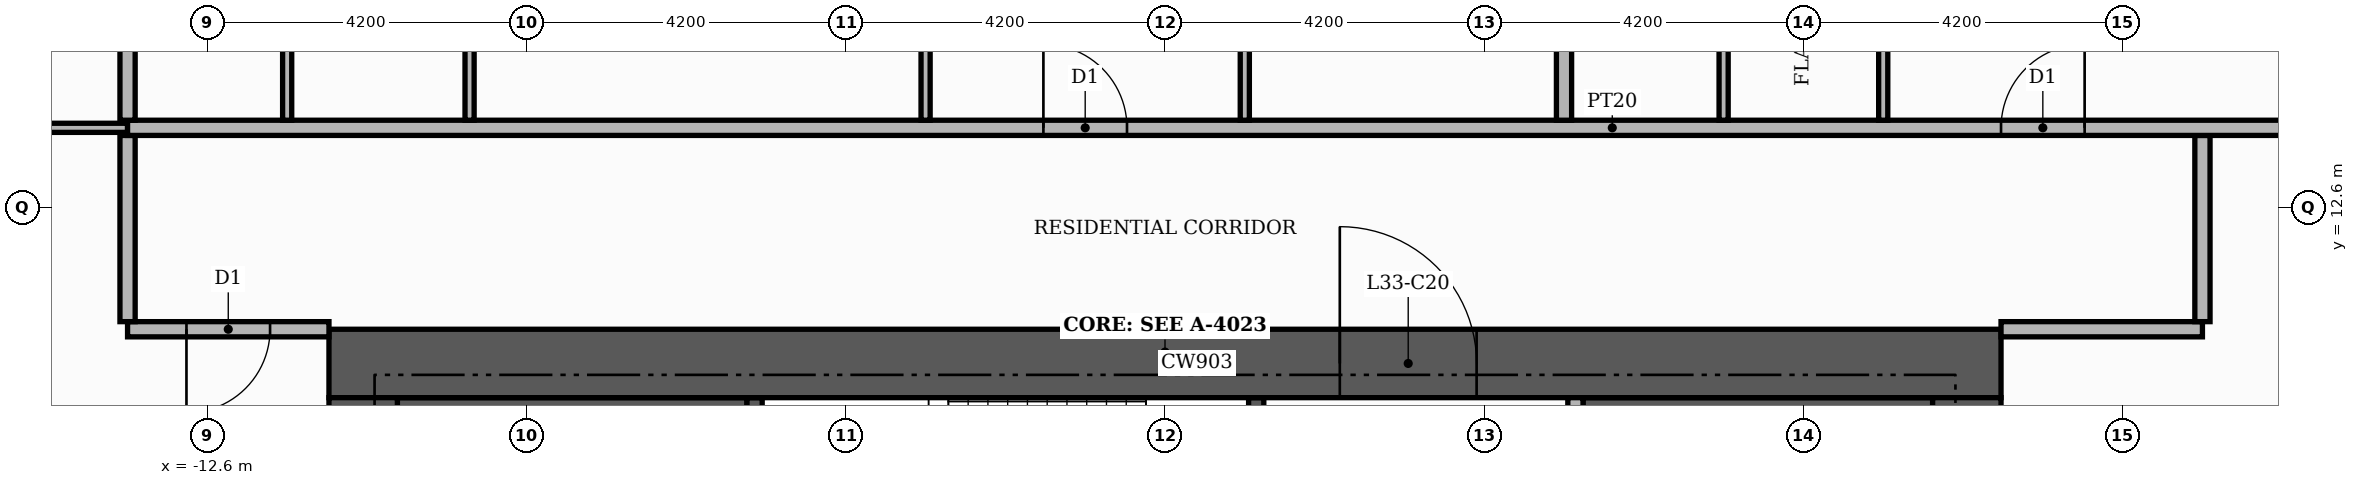
"""IFC4 building model, lengths in metres.
Left out: names, types, materials, properties, quantities, classifications, styles, units other than length and angle.
Written with IfcOpenShell. Run it as: python <this file> out.ifc"""

import sys

from ifc_helpers import new_model, si_unit, direction, frame, frame_2d, origin, place, context, subcontext, project, spatial, rectangle, extrude, element, fill, save


model = new_model("IFC4")
c1 = context("Model", 3, precision=1e-05, world=origin(), true_north=direction((0.0, 1.0)))
c2 = subcontext(c1, "Body", "Model", "MODEL_VIEW")
j1 = project(units=[si_unit("LENGTHUNIT", "METRE"), si_unit("PLANEANGLEUNIT", "RADIAN")], contexts=[c1])
p1 = place(None, origin())
s1 = spatial("IfcSite", under=j1, at=p1, CompositionType="ELEMENT")
p2 = place(p1, origin())
s2 = spatial("IfcBuilding", under=s1, at=p2, CompositionType="ELEMENT")
p3 = place(p2, frame((0.0, 0.0, 141.6)))
s3 = spatial("IfcBuildingStorey", under=s2, at=p3, CompositionType="ELEMENT", Elevation=141.6)
for number, where, z_axis, x_axis in (
    (1, (-10.1, 9.15, 0.0), (0.0, 0.0, 1.0), (1.0, 0.0, 0.0)),
    (2, (5.5, 9.15, 0.0), (0.0, 0.0, 1.0), (1.0, 0.0, 0.0)),
):
    element("IfcWall", number, at=place(p3, frame(where, z_axis=z_axis, x_axis=x_axis)), inside=s3, PredefinedType="SHEAR", context=c2, shape_type="SweptSolid", body=[
        extrude(rectangle(XDim=4.6, YDim=1.9, at=frame_2d((2.3, 0.0))), origin(), (0.0, 0.0, 1.0), 3.48),
    ])
p4 = place(p3, frame((-5.4, 7.25, 0.0), z_axis=(0.0, 0.0, 1.0), x_axis=(0.0, 1.0, 0.0)))
e3 = element("IfcWall", 3, at=p4, inside=s3, PredefinedType="SHEAR", context=c2, shape_type="SweptSolid", body=[
    extrude(rectangle(XDim=2.85, YDim=0.2, at=frame_2d((1.425, 0.0))), origin(), (0.0, 0.0, 1.0), 3.48),
])
p5 = place(p3, frame((1.2, 7.25, 0.0), z_axis=(0.0, 0.0, 1.0), x_axis=(0.0, 1.0, 0.0)))
e4 = element("IfcWall", 4, at=p5, inside=s3, PredefinedType="SHEAR", context=c2, shape_type="SweptSolid", body=[
    extrude(rectangle(XDim=2.85, YDim=0.2, at=frame_2d((1.425, 0.0))), origin(), (0.0, 0.0, 1.0), 3.48),
])
p6 = place(p5, frame((0.85, 0.0, 0.0)))
e5 = element("IfcOpeningElement", 5, at=p6, cuts=e4, PredefinedType="OPENING", context=c2, shape_type="SweptSolid", body=[
    extrude(rectangle(XDim=1.0, YDim=2.1, at=frame_2d((0.5, 1.05))), frame((0.0, 0.11, 0.0), z_axis=(0.0, -1.0, 0.0), x_axis=(1.0, 0.0, 0.0)), (0.0, 0.0, 1.0), 0.22),
])
p7 = place(p3, frame((-11.0, 10.55, 0.0), z_axis=(0.0, 0.0, 1.0), x_axis=(1.0, 0.0, 0.0)))
e6 = element("IfcWall", 6, at=p7, inside=s3, PredefinedType="SHEAR", context=c2, shape_type="SweptSolid", body=[
    extrude(rectangle(XDim=22.0, YDim=0.9, at=frame_2d((11.0, 0.0))), origin(), (0.0, 0.0, 1.0), 3.48),
])
p8 = place(p7, frame((13.3, 0.0, 0.0)))
e7 = element("IfcOpeningElement", 7, at=p8, cuts=e6, PredefinedType="OPENING", context=c2, shape_type="SweptSolid", body=[
    extrude(rectangle(XDim=1.8, YDim=2.2, at=frame_2d((0.9, 1.1))), frame((0.0, 0.46, 0.0), z_axis=(0.0, -1.0, 0.0), x_axis=(1.0, 0.0, 0.0)), (0.0, 0.0, 1.0), 0.92),
])
for number, where, z_axis, x_axis in (
    (8, (-10.55, -10.1, 0.0), (0.0, 0.0, 1.0), (0.0, 1.0, 0.0)),
    (9, (10.55, -10.1, 0.0), (0.0, 0.0, 1.0), (0.0, 1.0, 0.0)),
):
    element("IfcWall", number, at=place(p3, frame(where, z_axis=z_axis, x_axis=x_axis)), inside=s3, PredefinedType="SHEAR", context=c2, shape_type="SweptSolid", body=[
        extrude(rectangle(XDim=20.2, YDim=0.9, at=frame_2d((10.1, 0.0))), origin(), (0.0, 0.0, 1.0), 3.48),
    ])
p9 = place(p3, frame((5.4, 5.5, 0.0), z_axis=(0.0, 0.0, 1.0), x_axis=(0.0, 1.0, 0.0)))
e10 = element("IfcWall", 10, at=p9, inside=s3, PredefinedType="PARTITIONING", context=c2, shape_type="SweptSolid", body=[
    extrude(rectangle(XDim=4.6, YDim=0.2, at=frame_2d((2.3, 0.0))), origin(), (0.0, 0.0, 1.0), 3.48),
])
p10 = place(p9, frame((0.25, 0.0, 0.0)))
e11 = element("IfcOpeningElement", 11, at=p10, cuts=e10, PredefinedType="OPENING", context=c2, shape_type="SweptSolid", body=[
    extrude(rectangle(XDim=1.0, YDim=2.1, at=frame_2d((0.5, 1.05))), frame((0.0, 0.11, 0.0), z_axis=(0.0, -1.0, 0.0), x_axis=(1.0, 0.0, 0.0)), (0.0, 0.0, 1.0), 0.22),
])
p11 = place(p3, frame((-13.65, 11.0, 0.0), z_axis=(0.0, 0.0, 1.0), x_axis=(1.0, 0.0, 0.0)))
e12 = element("IfcWall", 12, at=p11, inside=s3, PredefinedType="PARTITIONING", context=c2, shape_type="SweptSolid", body=[
    extrude(rectangle(XDim=2.65, YDim=0.2, at=frame_2d((1.325, 0.0))), origin(), (0.0, 0.0, 1.0), 3.48),
])
p12 = place(p11, frame((0.775, 0.0, 0.0)))
e13 = element("IfcOpeningElement", 13, at=p12, cuts=e12, PredefinedType="OPENING", context=c2, shape_type="SweptSolid", body=[
    extrude(rectangle(XDim=1.1, YDim=2.4, at=frame_2d((0.55, 1.2))), frame((0.0, 0.11, 0.0), z_axis=(0.0, -1.0, 0.0), x_axis=(1.0, 0.0, 0.0)), (0.0, 0.0, 1.0), 0.22),
])
p13 = place(p3, frame((11.0, 11.0, 0.0), z_axis=(0.0, 0.0, 1.0), x_axis=(1.0, 0.0, 0.0)))
e14 = element("IfcWall", 14, at=p13, inside=s3, PredefinedType="PARTITIONING", context=c2, shape_type="SweptSolid", body=[
    extrude(rectangle(XDim=2.65, YDim=0.2, at=frame_2d((1.325, 0.0))), origin(), (0.0, 0.0, 1.0), 3.48),
])
for number, where, z_axis, x_axis in (
    (15, (-13.65, 11.1, 0.0), (0.0, 0.0, 1.0), (0.0, 1.0, 0.0)),
    (16, (13.65, 11.1, 0.0), (0.0, 0.0, 1.0), (0.0, 1.0, 0.0)),
):
    element("IfcWall", number, at=place(p3, frame(where, z_axis=z_axis, x_axis=x_axis)), inside=s3, PredefinedType="PARTITIONING", context=c2, shape_type="SweptSolid", body=[
        extrude(rectangle(XDim=2.45, YDim=0.2, at=frame_2d((1.225, 0.0))), origin(), (0.0, 0.0, 1.0), 3.48),
    ])
p14 = place(p3, frame((-20.42, 13.65, 0.0), z_axis=(0.0, 0.0, 1.0), x_axis=(1.0, 0.0, 0.0)))
e17 = element("IfcWall", 17, at=p14, inside=s3, PredefinedType="PARTITIONING", context=c2, shape_type="SweptSolid", body=[
    extrude(rectangle(XDim=6.77, YDim=0.12, at=frame_2d((3.385, 0.0))), origin(), (0.0, 0.0, 1.0), 3.48),
])
p15 = place(p14, frame((2.935, 0.0, 0.0)))
e18 = element("IfcOpeningElement", 18, at=p15, cuts=e17, PredefinedType="OPENING", context=c2, shape_type="SweptSolid", body=[
    extrude(rectangle(XDim=0.9, YDim=2.1, at=frame_2d((0.45, 1.05))), frame((0.0, 0.07, 0.0), z_axis=(0.0, -1.0, 0.0), x_axis=(1.0, 0.0, 0.0)), (0.0, 0.0, 1.0), 0.14),
])
p16 = place(p3, frame((-13.65, 13.65, 0.0), z_axis=(0.0, 0.0, 1.0), x_axis=(1.0, 0.0, 0.0)))
e19 = element("IfcWall", 19, at=p16, inside=s3, PredefinedType="PARTITIONING", context=c2, shape_type="SweptSolid", body=[
    extrude(rectangle(XDim=39.07, YDim=0.2, at=frame_2d((19.535, 0.0))), origin(), (0.0, 0.0, 1.0), 3.48),
])
p17 = place(p16, frame((24.65, 0.0, 0.0)))
e20 = element("IfcOpeningElement", 20, at=p17, cuts=e19, PredefinedType="OPENING", context=c2, shape_type="SweptSolid", body=[
    extrude(rectangle(XDim=1.1, YDim=2.4, at=frame_2d((0.55, 1.2))), frame((0.0, 0.11, 0.0), z_axis=(0.0, -1.0, 0.0), x_axis=(1.0, 0.0, 0.0)), (0.0, 0.0, 1.0), 0.22),
])
p18 = place(p16, frame((12.05, 0.0, 0.0)))
e21 = element("IfcOpeningElement", 21, at=p18, cuts=e19, PredefinedType="OPENING", context=c2, shape_type="SweptSolid", body=[
    extrude(rectangle(XDim=1.1, YDim=2.4, at=frame_2d((0.55, 1.2))), frame((0.0, 0.11, 0.0), z_axis=(0.0, -1.0, 0.0), x_axis=(1.0, 0.0, 0.0)), (0.0, 0.0, 1.0), 0.22),
])
p19 = place(p3, frame((-13.65, 13.75, 0.0), z_axis=(0.0, 0.0, 1.0), x_axis=(0.0, 1.0, 0.0)))
e22 = element("IfcWall", 22, at=p19, inside=s3, PredefinedType="PARTITIONING", context=c2, shape_type="SweptSolid", body=[
    extrude(rectangle(XDim=11.67, YDim=0.2, at=frame_2d((5.835, 0.0))), origin(), (0.0, 0.0, 1.0), 3.48),
])
for number, where, z_axis, x_axis in (
    (23, (-11.55, 13.75, 0.0), (0.0, 0.0, 1.0), (0.0, 1.0, 0.0)),
    (24, (-9.15, 13.75, 0.0), (0.0, 0.0, 1.0), (0.0, 1.0, 0.0)),
    (25, (-3.15, 13.75, 0.0), (0.0, 0.0, 1.0), (0.0, 1.0, 0.0)),
):
    element("IfcWall", number, at=place(p3, frame(where, z_axis=z_axis, x_axis=x_axis)), inside=s3, PredefinedType="PARTITIONING", context=c2, shape_type="SweptSolid", body=[
        extrude(rectangle(XDim=5.41, YDim=0.12, at=frame_2d((2.705, 0.0))), origin(), (0.0, 0.0, 1.0), 3.48),
    ])
p20 = place(p3, frame((1.05, 13.75, 0.0), z_axis=(0.0, 0.0, 1.0), x_axis=(0.0, 1.0, 0.0)))
e26 = element("IfcWall", 26, at=p20, inside=s3, PredefinedType="PARTITIONING", context=c2, shape_type="SweptSolid", body=[
    extrude(rectangle(XDim=5.41, YDim=0.12, at=frame_2d((2.705, 0.0))), origin(), (0.0, 0.0, 1.0), 3.48),
])
p21 = place(p20, frame((2.185, 0.0, 0.0)))
e27 = element("IfcOpeningElement", 27, at=p21, cuts=e26, PredefinedType="OPENING", context=c2, shape_type="SweptSolid", body=[
    extrude(rectangle(XDim=1.0, YDim=2.1, at=frame_2d((0.5, 1.05))), frame((0.0, 0.07, 0.0), z_axis=(0.0, -1.0, 0.0), x_axis=(1.0, 0.0, 0.0)), (0.0, 0.0, 1.0), 0.14),
])
p22 = place(p3, frame((5.25, 13.75, 0.0), z_axis=(0.0, 0.0, 1.0), x_axis=(0.0, 1.0, 0.0)))
e28 = element("IfcWall", 28, at=p22, inside=s3, PredefinedType="PARTITIONING", context=c2, shape_type="SweptSolid", body=[
    extrude(rectangle(XDim=6.67, YDim=0.2, at=frame_2d((3.335, 0.0))), origin(), (0.0, 0.0, 1.0), 3.48),
])
p23 = place(p3, frame((7.35, 13.75, 0.0), z_axis=(0.0, 0.0, 1.0), x_axis=(0.0, 1.0, 0.0)))
e29 = element("IfcWall", 29, at=p23, inside=s3, PredefinedType="PARTITIONING", context=c2, shape_type="SweptSolid", body=[
    extrude(rectangle(XDim=5.11, YDim=0.12, at=frame_2d((2.555, 0.0))), origin(), (0.0, 0.0, 1.0), 3.48),
])
p24 = place(p3, frame((9.45, 13.75, 0.0), z_axis=(0.0, 0.0, 1.0), x_axis=(0.0, 1.0, 0.0)))
e30 = element("IfcWall", 30, at=p24, inside=s3, PredefinedType="PARTITIONING", context=c2, shape_type="SweptSolid", body=[
    extrude(rectangle(XDim=5.11, YDim=0.12, at=frame_2d((2.555, 0.0))), origin(), (0.0, 0.0, 1.0), 3.48),
])
p25 = place(p24, frame((2.085, 0.0, 0.0)))
e31 = element("IfcOpeningElement", 31, at=p25, cuts=e30, PredefinedType="OPENING", context=c2, shape_type="SweptSolid", body=[
    extrude(rectangle(XDim=0.9, YDim=2.1, at=frame_2d((0.45, 1.05))), frame((0.0, 0.07, 0.0), z_axis=(0.0, -1.0, 0.0), x_axis=(1.0, 0.0, 0.0)), (0.0, 0.0, 1.0), 0.14),
])
p26 = place(p8, origin())
e32 = element("IfcDoor", 32, at=p26, inside=s3, OperationType="DOUBLE_DOOR_SINGLE_SWING", PredefinedType="DOOR", context=c2, shape_type="SweptSolid", body=[
    extrude(rectangle(XDim=1.8, YDim=2.2, at=frame_2d((0.9, 1.1))), frame((0.0, 0.025, 0.0), z_axis=(0.0, -1.0, 0.0), x_axis=(1.0, 0.0, 0.0)), (0.0, 0.0, 1.0), 0.05),
])
fill(e7, e32)
p27 = place(p17, origin())
e33 = element("IfcDoor", 33, at=p27, inside=s3, OperationType="SINGLE_SWING_RIGHT", PredefinedType="DOOR", context=c2, shape_type="SweptSolid", body=[
    extrude(rectangle(XDim=1.1, YDim=2.4, at=frame_2d((0.55, 1.2))), frame((0.0, 0.025, 0.0), z_axis=(0.0, -1.0, 0.0), x_axis=(1.0, 0.0, 0.0)), (0.0, 0.0, 1.0), 0.05),
])
fill(e20, e33)
p28 = place(p18, origin())
e34 = element("IfcDoor", 34, at=p28, inside=s3, OperationType="SINGLE_SWING_LEFT", PredefinedType="DOOR", context=c2, shape_type="SweptSolid", body=[
    extrude(rectangle(XDim=1.1, YDim=2.4, at=frame_2d((0.55, 1.2))), frame((0.0, 0.025, 0.0), z_axis=(0.0, -1.0, 0.0), x_axis=(1.0, 0.0, 0.0)), (0.0, 0.0, 1.0), 0.05),
])
fill(e21, e34)
p29 = place(p12, frame((1.1, 0.0, 0.0), z_axis=(0.0, 0.0, 1.0), x_axis=(-1.0, 0.0, 0.0)))
e35 = element("IfcDoor", 35, at=p29, inside=s3, OperationType="SINGLE_SWING_LEFT", PredefinedType="DOOR", context=c2, shape_type="SweptSolid", body=[
    extrude(rectangle(XDim=1.1, YDim=2.4, at=frame_2d((0.55, 1.2))), frame((0.0, 0.025, 0.0), z_axis=(0.0, -1.0, 0.0), x_axis=(1.0, 0.0, 0.0)), (0.0, 0.0, 1.0), 0.05),
])
fill(e13, e35)
save(model, sys.argv[1])
